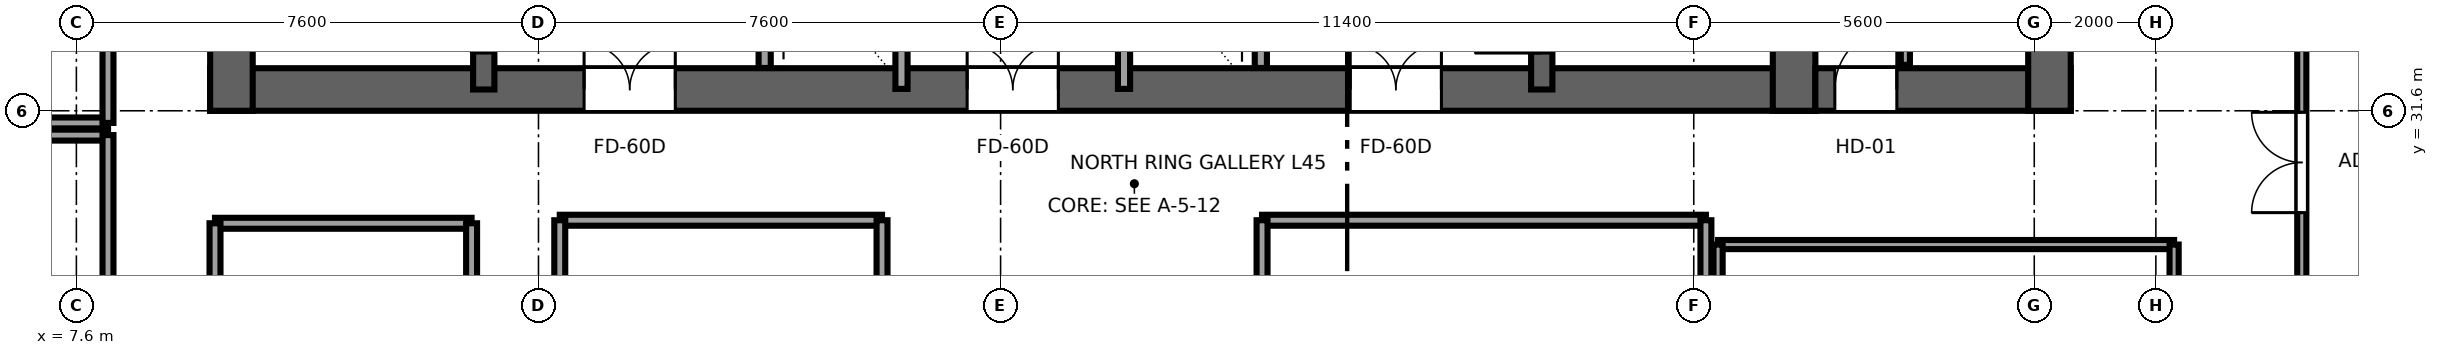
"""IFC4 building model, lengths in metres.
Left out: names, types, materials, properties, quantities, classifications, styles, units other than length and angle.
Written with IfcOpenShell. Run it as: python <this file> out.ifc"""

import sys

from ifc_helpers import new_model, si_unit, direction, frame, frame_2d, origin, place, context, subcontext, project, spatial, rectangle, extrude, source, transform, mapped, element, fill, save


model = new_model("IFC4")
c1 = context("Model", 3, precision=1e-05, world=origin(), true_north=direction((0.0, 1.0)))
c2 = subcontext(c1, "Body", "Model", "MODEL_VIEW")
j1 = project(units=[si_unit("LENGTHUNIT", "METRE"), si_unit("PLANEANGLEUNIT", "RADIAN")], contexts=[c1])
p1 = place(None, origin())
s1 = spatial("IfcSite", under=j1, at=p1, CompositionType="ELEMENT")
p2 = place(p1, origin())
s2 = spatial("IfcBuilding", under=s1, at=p2, CompositionType="ELEMENT")
p3 = place(p2, frame((0.0, 0.0, 171.9)))
s3 = spatial("IfcBuildingStorey", under=s2, at=p3, CompositionType="ELEMENT", Elevation=171.9)
p4 = place(p3, frame((9.8, 31.95, 0.0), z_axis=(0.0, 0.0, 1.0), x_axis=(1.0, 0.0, 0.0)))
e1 = element("IfcWall", 1, at=p4, inside=s3, PredefinedType="SHEAR", context=c2, shape_type="SweptSolid", body=[
    extrude(rectangle(XDim=26.4, YDim=0.7, at=frame_2d((13.2, 0.0))), origin(), (0.0, 0.0, 1.0), 3.55),
])
p5 = place(p4, frame((7.65, 0.0, 0.0), z_axis=(0.0, 0.0, 1.0), x_axis=(-1.0, 0.0, 0.0)))
e2 = element("IfcOpeningElement", 2, at=p5, cuts=e1, PredefinedType="OPENING", context=c2, shape_type="SweptSolid", body=[
    extrude(rectangle(XDim=1.5, YDim=2.04, at=frame_2d((0.75, 1.02))), frame((0.0, 0.36, 0.0), z_axis=(0.0, -1.0, 0.0), x_axis=(1.0, 0.0, 0.0)), (0.0, 0.0, 1.0), 0.72),
])
p6 = place(p4, frame((13.95, 0.0, 0.0), z_axis=(0.0, 0.0, 1.0), x_axis=(-1.0, 0.0, 0.0)))
e3 = element("IfcOpeningElement", 3, at=p6, cuts=e1, PredefinedType="OPENING", context=c2, shape_type="SweptSolid", body=[
    extrude(rectangle(XDim=1.5, YDim=2.04, at=frame_2d((0.75, 1.02))), frame((0.0, 0.36, 0.0), z_axis=(0.0, -1.0, 0.0), x_axis=(1.0, 0.0, 0.0)), (0.0, 0.0, 1.0), 0.72),
])
p7 = place(p4, frame((20.25, 0.0, 0.0), z_axis=(0.0, 0.0, 1.0), x_axis=(-1.0, 0.0, 0.0)))
e4 = element("IfcOpeningElement", 4, at=p7, cuts=e1, PredefinedType="OPENING", context=c2, shape_type="SweptSolid", body=[
    extrude(rectangle(XDim=1.5, YDim=2.04, at=frame_2d((0.75, 1.02))), frame((0.0, 0.36, 0.0), z_axis=(0.0, -1.0, 0.0), x_axis=(1.0, 0.0, 0.0)), (0.0, 0.0, 1.0), 0.72),
])
for number, where, z_axis, x_axis in (
    (5, (10.15, 31.6, 0.0), (0.0, 0.0, 1.0), (0.0, 1.0, 0.0)),
    (6, (35.85, 31.6, 0.0), (0.0, 0.0, 1.0), (0.0, 1.0, 0.0)),
):
    element("IfcWall", number, at=place(p3, frame(where, z_axis=z_axis, x_axis=x_axis)), inside=s3, PredefinedType="SHEAR", context=c2, shape_type="SweptSolid", body=[
        extrude(rectangle(XDim=13.6, YDim=0.7, at=frame_2d((6.8, 0.0))), origin(), (0.0, 0.0, 1.0), 3.55),
    ])
p8 = place(p3, frame((14.3, 31.95, 0.0), z_axis=(0.0, 0.0, 1.0), x_axis=(0.0, 1.0, 0.0)))
e7 = element("IfcWall", 7, at=p8, inside=s3, PredefinedType="SHEAR", context=c2, shape_type="SweptSolid", body=[
    extrude(rectangle(XDim=12.9, YDim=0.35, at=frame_2d((6.45, 0.0))), origin(), (0.0, 0.0, 1.0), 3.55),
])
p9 = place(p8, frame((0.6, 0.0, 0.0)))
e8 = element("IfcOpeningElement", 8, at=p9, cuts=e7, PredefinedType="OPENING", context=c2, shape_type="SweptSolid", body=[
    extrude(rectangle(XDim=1.1, YDim=2.12, at=frame_2d((0.55, 1.06))), frame((0.0, 0.185, 0.0), z_axis=(0.0, -1.0, 0.0), x_axis=(1.0, 0.0, 0.0)), (0.0, 0.0, 1.0), 0.37),
])
p10 = place(p3, frame((31.7, 31.95, 0.0), z_axis=(0.0, 0.0, 1.0), x_axis=(0.0, 1.0, 0.0)))
e9 = element("IfcWall", 9, at=p10, inside=s3, PredefinedType="SHEAR", context=c2, shape_type="SweptSolid", body=[
    extrude(rectangle(XDim=12.9, YDim=0.35, at=frame_2d((6.45, 0.0))), origin(), (0.0, 0.0, 1.0), 3.55),
])
p11 = place(p10, frame((1.7, 0.0, 0.0), z_axis=(0.0, 0.0, 1.0), x_axis=(-1.0, 0.0, 0.0)))
e10 = element("IfcOpeningElement", 10, at=p11, cuts=e9, PredefinedType="OPENING", context=c2, shape_type="SweptSolid", body=[
    extrude(rectangle(XDim=1.1, YDim=2.12, at=frame_2d((0.55, 1.06))), frame((0.0, 0.185, 0.0), z_axis=(0.0, -1.0, 0.0), x_axis=(1.0, 0.0, 0.0)), (0.0, 0.0, 1.0), 0.37),
])
p12 = place(p3, frame((36.2, 31.95, 0.0), z_axis=(0.0, 0.0, 1.0), x_axis=(1.0, 0.0, 0.0)))
e11 = element("IfcWall", 11, at=p12, inside=s3, PredefinedType="SHEAR", context=c2, shape_type="SweptSolid", body=[
    extrude(rectangle(XDim=4.2, YDim=0.7, at=frame_2d((2.1, 0.0))), origin(), (0.0, 0.0, 1.0), 3.55),
])
p13 = place(p12, frame((1.34, 0.0, 0.0), z_axis=(0.0, 0.0, 1.0), x_axis=(-1.0, 0.0, 0.0)))
e12 = element("IfcOpeningElement", 12, at=p13, cuts=e11, PredefinedType="OPENING", context=c2, shape_type="SweptSolid", body=[
    extrude(rectangle(XDim=1.02, YDim=2.03, at=frame_2d((0.51, 1.015))), frame((0.0, 0.36, 0.0), z_axis=(0.0, -1.0, 0.0), x_axis=(1.0, 0.0, 0.0)), (0.0, 0.0, 1.0), 0.72),
])
p14 = place(p3, frame((40.05, 31.6, 0.0), z_axis=(0.0, 0.0, 1.0), x_axis=(0.0, 1.0, 0.0)))
e13 = element("IfcWall", 13, at=p14, inside=s3, PredefinedType="SHEAR", context=c2, shape_type="SweptSolid", body=[
    extrude(rectangle(XDim=13.6, YDim=0.7, at=frame_2d((6.8, 0.0))), origin(), (0.0, 0.0, 1.0), 3.55),
])
for number, where, z_axis, x_axis in (
    (14, (18.92, 32.304, 0.0), (0.0, 0.0, 1.0), (0.0, 1.0, 0.0)),
    (15, (27.08, 32.304, 0.0), (0.0, 0.0, 1.0), (0.0, 1.0, 0.0)),
):
    element("IfcWall", number, at=place(p3, frame(where, z_axis=z_axis, x_axis=x_axis)), inside=s3, PredefinedType="SOLIDWALL", context=c2, shape_type="SweptSolid", body=[
        extrude(rectangle(XDim=3.846, YDim=0.2, at=frame_2d((1.923, 0.0))), origin(), (0.0, 0.0, 1.0), 3.37),
    ])
p15 = place(p3, frame((21.17, 31.96, 0.0), z_axis=(0.0, 0.0, 1.0), x_axis=(0.0, 1.0, 0.0)))
e16 = element("IfcWall", 16, at=p15, inside=s3, PredefinedType="SOLIDWALL", context=c2, shape_type="SweptSolid", body=[
    extrude(rectangle(XDim=12.58, YDim=0.2, at=frame_2d((6.29, 0.0))), origin(), (0.0, 0.0, 1.0), 3.37),
])
p16 = place(p15, frame((5.74, 0.0, 0.0)))
e17 = element("IfcOpeningElement", 17, at=p16, cuts=e16, PredefinedType="OPENING", context=c2, shape_type="SweptSolid", body=[
    extrude(rectangle(XDim=1.1, YDim=2.12, at=frame_2d((0.55, 1.06))), frame((0.0, 0.11, 0.0), z_axis=(0.0, -1.0, 0.0), x_axis=(1.0, 0.0, 0.0)), (0.0, 0.0, 1.0), 0.22),
])
p17 = place(p15, frame((8.24, 0.0, 0.0)))
e18 = element("IfcOpeningElement", 18, at=p17, cuts=e16, PredefinedType="OPENING", context=c2, shape_type="SweptSolid", body=[
    extrude(rectangle(XDim=1.1, YDim=2.12, at=frame_2d((0.55, 1.06))), frame((0.0, 0.11, 0.0), z_axis=(0.0, -1.0, 0.0), x_axis=(1.0, 0.0, 0.0)), (0.0, 0.0, 1.0), 0.22),
])
p18 = place(p3, frame((24.83, 31.96, 0.0), z_axis=(0.0, 0.0, 1.0), x_axis=(0.0, 1.0, 0.0)))
e19 = element("IfcWall", 19, at=p18, inside=s3, PredefinedType="SOLIDWALL", context=c2, shape_type="SweptSolid", body=[
    extrude(rectangle(XDim=12.58, YDim=0.2, at=frame_2d((6.29, 0.0))), origin(), (0.0, 0.0, 1.0), 3.37),
])
p19 = place(p18, frame((5.74, 0.0, 0.0)))
e20 = element("IfcOpeningElement", 20, at=p19, cuts=e19, PredefinedType="OPENING", context=c2, shape_type="SweptSolid", body=[
    extrude(rectangle(XDim=1.1, YDim=2.12, at=frame_2d((0.55, 1.06))), frame((0.0, 0.11, 0.0), z_axis=(0.0, -1.0, 0.0), x_axis=(1.0, 0.0, 0.0)), (0.0, 0.0, 1.0), 0.22),
])
p20 = place(p18, frame((8.24, 0.0, 0.0)))
e21 = element("IfcOpeningElement", 21, at=p20, cuts=e19, PredefinedType="OPENING", context=c2, shape_type="SweptSolid", body=[
    extrude(rectangle(XDim=1.1, YDim=2.12, at=frame_2d((0.55, 1.06))), frame((0.0, 0.11, 0.0), z_axis=(0.0, -1.0, 0.0), x_axis=(1.0, 0.0, 0.0)), (0.0, 0.0, 1.0), 0.22),
])
p21 = place(p3, frame((37.68, 32.355, 0.0), z_axis=(0.0, 0.0, 1.0), x_axis=(0.0, 1.0, 0.0)))
e22 = element("IfcWall", 22, at=p21, inside=s3, PredefinedType="PARTITIONING", context=c2, shape_type="SweptSolid", body=[
    extrude(rectangle(XDim=5.845, YDim=0.15, at=frame_2d((2.922, 0.0))), origin(), (0.0, 0.0, 1.0), 3.37),
])
p22 = place(p21, frame((2.413, 0.0, 0.0)))
e23 = element("IfcOpeningElement", 23, at=p22, cuts=e22, PredefinedType="OPENING", context=c2, shape_type="SweptSolid", body=[
    extrude(rectangle(XDim=1.02, YDim=2.03, at=frame_2d((0.51, 1.015))), frame((0.0, 0.085, 0.0), z_axis=(0.0, -1.0, 0.0), x_axis=(1.0, 0.0, 0.0)), (0.0, 0.0, 1.0), 0.17),
])
p23 = place(p3, frame((3.005, 31.2, 0.0), z_axis=(0.0, 0.0, 1.0), x_axis=(1.0, 0.0, 0.0)))
e24 = element("IfcWall", 24, at=p23, inside=s3, PredefinedType="PARTITIONING", context=c2, shape_type="SweptSolid", body=[
    extrude(rectangle(XDim=5.115, YDim=0.18, at=frame_2d((2.558, 0.0))), origin(), (0.0, 0.0, 1.0), 3.37),
])
p24 = place(p3, frame((8.12, 23.1, 0.0), z_axis=(0.0, 0.0, 1.0), x_axis=(0.0, 1.0, 0.0)))
e25 = element("IfcWall", 25, at=p24, inside=s3, PredefinedType="PARTITIONING", context=c2, shape_type="SweptSolid", body=[
    extrude(rectangle(XDim=8.1, YDim=0.18, at=frame_2d((4.05, 0.0))), origin(), (0.0, 0.0, 1.0), 3.37),
])
p25 = place(p24, frame((3.225, 0.0, 0.0)))
e26 = element("IfcOpeningElement", 26, at=p25, cuts=e25, PredefinedType="OPENING", context=c2, shape_type="SweptSolid", body=[
    extrude(rectangle(XDim=1.65, YDim=2.15, at=frame_2d((0.825, 1.075))), frame((0.0, 0.1, 0.0), z_axis=(0.0, -1.0, 0.0), x_axis=(1.0, 0.0, 0.0)), (0.0, 0.0, 1.0), 0.2),
])
p26 = place(p3, frame((3.005, 31.4, 0.0), z_axis=(0.0, 0.0, 1.0), x_axis=(1.0, 0.0, 0.0)))
e27 = element("IfcWall", 27, at=p26, inside=s3, PredefinedType="PARTITIONING", context=c2, shape_type="SweptSolid", body=[
    extrude(rectangle(XDim=5.115, YDim=0.18, at=frame_2d((2.558, 0.0))), origin(), (0.0, 0.0, 1.0), 3.37),
])
p27 = place(p3, frame((8.12, 31.4, 0.0), z_axis=(0.0, 0.0, 1.0), x_axis=(0.0, 1.0, 0.0)))
e28 = element("IfcWall", 28, at=p27, inside=s3, PredefinedType="PARTITIONING", context=c2, shape_type="SweptSolid", body=[
    extrude(rectangle(XDim=6.8, YDim=0.18, at=frame_2d((3.4, 0.0))), origin(), (0.0, 0.0, 1.0), 3.37),
])
p28 = place(p27, frame((3.175, 0.0, 0.0)))
e29 = element("IfcOpeningElement", 29, at=p28, cuts=e28, PredefinedType="OPENING", context=c2, shape_type="SweptSolid", body=[
    extrude(rectangle(XDim=1.65, YDim=2.15, at=frame_2d((0.825, 1.075))), frame((0.0, 0.1, 0.0), z_axis=(0.0, -1.0, 0.0), x_axis=(1.0, 0.0, 0.0)), (0.0, 0.0, 1.0), 0.2),
])
p29 = place(p3, frame((44.2, 26.9, 0.0), z_axis=(0.0, 0.0, 1.0), x_axis=(0.0, 1.0, 0.0)))
e30 = element("IfcWall", 30, at=p29, inside=s3, PredefinedType="PARTITIONING", context=c2, shape_type="SweptSolid", body=[
    extrude(rectangle(XDim=7.7, YDim=0.15, at=frame_2d((3.85, 0.0))), origin(), (0.0, 0.0, 1.0), 3.37),
])
p30 = place(p29, frame((3.025, 0.0, 0.0)))
e31 = element("IfcOpeningElement", 31, at=p30, cuts=e30, PredefinedType="OPENING", context=c2, shape_type="SweptSolid", body=[
    extrude(rectangle(XDim=1.65, YDim=2.15, at=frame_2d((0.825, 1.075))), frame((0.0, 0.085, 0.0), z_axis=(0.0, -1.0, 0.0), x_axis=(1.0, 0.0, 0.0)), (0.0, 0.0, 1.0), 0.17),
])
p31 = place(p3, frame((9.88, 29.75, 0.0), z_axis=(0.0, 0.0, 1.0), x_axis=(1.0, 0.0, 0.0)))
e32 = element("IfcWall", 32, at=p31, inside=s3, PredefinedType="PARTITIONING", context=c2, shape_type="SweptSolid", body=[
    extrude(rectangle(XDim=4.22, YDim=0.18, at=frame_2d((2.11, 0.0))), origin(), (0.0, 0.0, 1.0), 3.37),
])
for number, where, z_axis, x_axis in (
    (33, (9.88, 23.1, 0.0), (0.0, 0.0, 1.0), (0.0, 1.0, 0.0)),
    (34, (14.1, 23.1, 0.0), (0.0, 0.0, 1.0), (0.0, 1.0, 0.0)),
):
    element("IfcWall", number, at=place(p3, frame(where, z_axis=z_axis, x_axis=x_axis)), inside=s3, PredefinedType="PARTITIONING", context=c2, shape_type="SweptSolid", body=[
        extrude(rectangle(XDim=6.65, YDim=0.18, at=frame_2d((3.325, 0.0))), origin(), (0.0, 0.0, 1.0), 3.37),
    ])
p32 = place(p3, frame((27.1, 29.8, 0.0), z_axis=(0.0, 0.0, 1.0), x_axis=(1.0, 0.0, 0.0)))
e35 = element("IfcWall", 35, at=p32, inside=s3, PredefinedType="PARTITIONING", context=c2, shape_type="SweptSolid", body=[
    extrude(rectangle(XDim=7.3, YDim=0.18, at=frame_2d((3.65, 0.0))), origin(), (0.0, 0.0, 1.0), 3.37),
])
for number, where, z_axis, x_axis in (
    (36, (27.1, 23.1, 0.0), (0.0, 0.0, 1.0), (0.0, 1.0, 0.0)),
    (37, (34.4, 23.1, 0.0), (0.0, 0.0, 1.0), (0.0, 1.0, 0.0)),
):
    element("IfcWall", number, at=place(p3, frame(where, z_axis=z_axis, x_axis=x_axis)), inside=s3, PredefinedType="PARTITIONING", context=c2, shape_type="SweptSolid", body=[
        extrude(rectangle(XDim=6.7, YDim=0.18, at=frame_2d((3.35, 0.0))), origin(), (0.0, 0.0, 1.0), 3.37),
    ])
p33 = place(p3, frame((15.55, 29.8, 0.0), z_axis=(0.0, 0.0, 1.0), x_axis=(1.0, 0.0, 0.0)))
e38 = element("IfcWall", 38, at=p33, inside=s3, PredefinedType="PARTITIONING", context=c2, shape_type="SweptSolid", body=[
    extrude(rectangle(XDim=5.3, YDim=0.18, at=frame_2d((2.65, 0.0))), origin(), (0.0, 0.0, 1.0), 3.37),
])
for number, where, z_axis, x_axis in (
    (39, (15.55, 23.1, 0.0), (0.0, 0.0, 1.0), (0.0, 1.0, 0.0)),
    (40, (20.85, 23.1, 0.0), (0.0, 0.0, 1.0), (0.0, 1.0, 0.0)),
):
    element("IfcWall", number, at=place(p3, frame(where, z_axis=z_axis, x_axis=x_axis)), inside=s3, PredefinedType="PARTITIONING", context=c2, shape_type="SweptSolid", body=[
        extrude(rectangle(XDim=6.7, YDim=0.18, at=frame_2d((3.35, 0.0))), origin(), (0.0, 0.0, 1.0), 3.37),
    ])
p34 = place(p3, frame((34.6, 29.4, 0.0), z_axis=(0.0, 0.0, 1.0), x_axis=(1.0, 0.0, 0.0)))
e41 = element("IfcWall", 41, at=p34, inside=s3, PredefinedType="PARTITIONING", context=c2, shape_type="SweptSolid", body=[
    extrude(rectangle(XDim=7.5, YDim=0.15, at=frame_2d((3.75, 0.0))), origin(), (0.0, 0.0, 1.0), 3.37),
])
p35 = place(p3, frame((34.6, 23.1, 0.0), z_axis=(0.0, 0.0, 1.0), x_axis=(0.0, 1.0, 0.0)))
e42 = element("IfcWall", 42, at=p35, inside=s3, PredefinedType="PARTITIONING", context=c2, shape_type="SweptSolid", body=[
    extrude(rectangle(XDim=6.3, YDim=0.15, at=frame_2d((3.15, 0.0))), origin(), (0.0, 0.0, 1.0), 3.37),
])
p36 = place(p3, frame((42.1, 23.1, 0.0), z_axis=(0.0, 0.0, 1.0), x_axis=(0.0, 1.0, 0.0)))
e43 = element("IfcWall", 43, at=p36, inside=s3, PredefinedType="PARTITIONING", context=c2, shape_type="SweptSolid", body=[
    extrude(rectangle(XDim=6.3, YDim=0.15, at=frame_2d((3.15, 0.0))), origin(), (0.0, 0.0, 1.0), 2.16),
])
m1 = source(origin(), c2, "Body", "SweptSolid", [
    extrude(rectangle(XDim=1.1, YDim=2.12, at=frame_2d((0.55, 1.06))), frame((0.0, 0.025, 0.0), z_axis=(0.0, -1.0, 0.0), x_axis=(1.0, 0.0, 0.0)), (0.0, 0.0, 1.0), 0.05),
])
p37 = place(p9, origin())
e44 = element("IfcDoor", 44, at=p37, inside=s3, OperationType="SINGLE_SWING_RIGHT", PredefinedType="DOOR", context=c2, shape_type="MappedRepresentation", body=[
    mapped(m1, transform((0.0, 0.0, 0.0), x_axis=(1.0, 0.0, 0.0), y_axis=(0.0, 1.0, 0.0), z_axis=(0.0, 0.0, 1.0), scale=1.0)),
])
fill(e8, e44)
p38 = place(p11, origin())
e45 = element("IfcDoor", 45, at=p38, inside=s3, OperationType="SINGLE_SWING_LEFT", PredefinedType="DOOR", context=c2, shape_type="MappedRepresentation", body=[
    mapped(m1, transform((0.0, 0.0, 0.0), x_axis=(1.0, 0.0, 0.0), y_axis=(0.0, 1.0, 0.0), z_axis=(0.0, 0.0, 1.0), scale=1.0)),
])
fill(e10, e45)
m2 = source(origin(), c2, "Body", "SweptSolid", [
    extrude(rectangle(XDim=1.5, YDim=2.04, at=frame_2d((0.75, 1.02))), frame((0.0, 0.025, 0.0), z_axis=(0.0, -1.0, 0.0), x_axis=(1.0, 0.0, 0.0)), (0.0, 0.0, 1.0), 0.05),
])
p39 = place(p5, origin())
e46 = element("IfcDoor", 46, at=p39, inside=s3, OperationType="DOUBLE_DOOR_SINGLE_SWING", PredefinedType="DOOR", context=c2, shape_type="MappedRepresentation", body=[
    mapped(m2, transform((0.0, 0.0, 0.0), x_axis=(1.0, 0.0, 0.0), y_axis=(0.0, 1.0, 0.0), z_axis=(0.0, 0.0, 1.0), scale=1.0)),
])
fill(e2, e46)
p40 = place(p6, origin())
e47 = element("IfcDoor", 47, at=p40, inside=s3, OperationType="DOUBLE_DOOR_SINGLE_SWING", PredefinedType="DOOR", context=c2, shape_type="MappedRepresentation", body=[
    mapped(m2, transform((0.0, 0.0, 0.0), x_axis=(1.0, 0.0, 0.0), y_axis=(0.0, 1.0, 0.0), z_axis=(0.0, 0.0, 1.0), scale=1.0)),
])
fill(e3, e47)
p41 = place(p7, origin())
e48 = element("IfcDoor", 48, at=p41, inside=s3, OperationType="DOUBLE_DOOR_SINGLE_SWING", PredefinedType="DOOR", context=c2, shape_type="MappedRepresentation", body=[
    mapped(m2, transform((0.0, 0.0, 0.0), x_axis=(1.0, 0.0, 0.0), y_axis=(0.0, 1.0, 0.0), z_axis=(0.0, 0.0, 1.0), scale=1.0)),
])
fill(e4, e48)
m3 = source(origin(), c2, "Body", "SweptSolid", [
    extrude(rectangle(XDim=1.02, YDim=2.03, at=frame_2d((0.51, 1.015))), frame((0.0, 0.025, 0.0), z_axis=(0.0, -1.0, 0.0), x_axis=(1.0, 0.0, 0.0)), (0.0, 0.0, 1.0), 0.05),
])
p42 = place(p13, origin())
e49 = element("IfcDoor", 49, at=p42, inside=s3, OperationType="SINGLE_SWING_RIGHT", PredefinedType="DOOR", context=c2, shape_type="MappedRepresentation", body=[
    mapped(m3, transform((0.0, 0.0, 0.0), x_axis=(1.0, 0.0, 0.0), y_axis=(0.0, 1.0, 0.0), z_axis=(0.0, 0.0, 1.0), scale=1.0)),
])
fill(e12, e49)
m4 = source(origin(), c2, "Body", "SweptSolid", [
    extrude(rectangle(XDim=1.65, YDim=2.15, at=frame_2d((0.825, 1.075))), frame((0.0, 0.025, 0.0), z_axis=(0.0, -1.0, 0.0), x_axis=(1.0, 0.0, 0.0)), (0.0, 0.0, 1.0), 0.05),
])
p43 = place(p30, origin())
e50 = element("IfcDoor", 50, at=p43, inside=s3, OperationType="DOUBLE_DOOR_SINGLE_SWING", PredefinedType="DOOR", context=c2, shape_type="MappedRepresentation", body=[
    mapped(m4, transform((0.0, 0.0, 0.0), x_axis=(1.0, 0.0, 0.0), y_axis=(0.0, 1.0, 0.0), z_axis=(0.0, 0.0, 1.0), scale=1.0)),
])
fill(e31, e50)
save(model, sys.argv[1])
